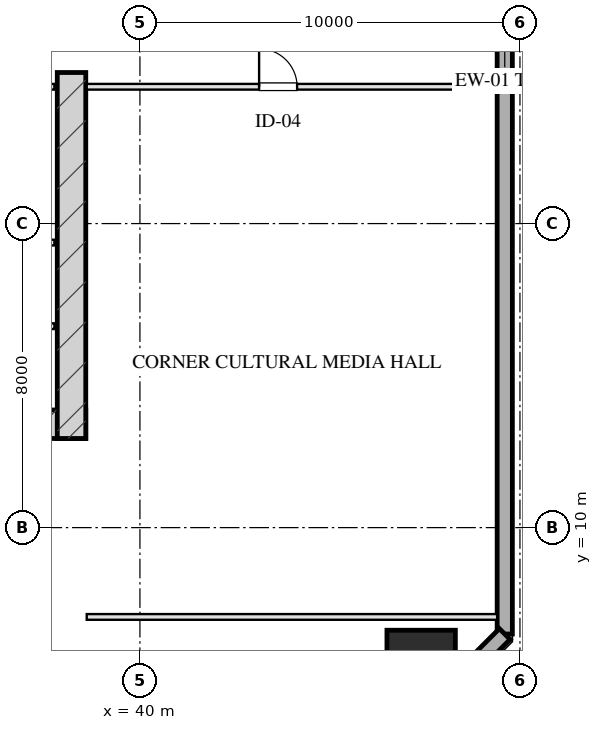
"""IFC4 building model, lengths in metres.
Left out: names, types, materials, properties, quantities, classifications, styles, units other than length and angle.
Written with IfcOpenShell. Run it as: python <this file> out.ifc"""

import sys

from ifc_helpers import new_model, si_unit, direction, frame, frame_2d, origin, origin_2d, place, context, subcontext, project, spatial, rectangle, hollow_rectangle, extrude, element, fill, save


model = new_model("IFC4")
c1 = context("Model", 3, precision=1e-05, world=origin(), true_north=direction((0.0, 1.0)))
c2 = subcontext(c1, "Body", "Model", "MODEL_VIEW")
j1 = project(units=[si_unit("LENGTHUNIT", "METRE"), si_unit("PLANEANGLEUNIT", "RADIAN")], contexts=[c1])
p1 = place(None, origin())
s1 = spatial("IfcSite", under=j1, at=p1, CompositionType="ELEMENT")
p2 = place(p1, origin())
s2 = spatial("IfcBuilding", under=s1, at=p2, CompositionType="ELEMENT")
p3 = place(p2, frame((0.0, 0.0, 78.2)))
s3 = spatial("IfcBuildingStorey", under=s2, at=p3, CompositionType="ELEMENT", Elevation=78.2)
p4 = place(p3, frame((21.425, 12.72, 0.0), z_axis=(0.0, 0.0, 1.0), x_axis=(1.0, 0.0, 0.0)))
e1 = element("IfcWall", 1, at=p4, inside=s3, PredefinedType="SHEAR", context=c2, shape_type="SweptSolid", body=[
    extrude(rectangle(XDim=17.15, YDim=0.75, at=frame_2d((8.575, 0.0))), origin(), (0.0, 0.0, 1.0), 3.45),
])
p5 = place(p3, frame((38.2, 21.975, 0.0), z_axis=(0.0, 0.0, 1.0), x_axis=(0.0, -1.0, 0.0)))
e2 = element("IfcWall", 2, at=p5, inside=s3, PredefinedType="SHEAR", context=c2, shape_type="SweptSolid", body=[
    extrude(rectangle(XDim=9.63, YDim=0.75, at=frame_2d((4.815, 0.0))), origin(), (0.0, 0.0, 1.0), 3.45),
])
p6 = place(p3, frame((47.4, 6.4, 0.0), z_axis=(0.0, 0.0, 1.0), x_axis=(1.0, 0.0, 0.0)))
e3 = element("IfcColumn", 3, at=p6, inside=s3, PredefinedType="COLUMN", context=c2, shape_type="SweptSolid", body=[
    extrude(hollow_rectangle(XDim=1.8, YDim=1.8, WallThickness=0.06, at=origin_2d()), origin(), (0.0, 0.0, 1.0), 3.451),
])
p7 = place(p3, frame((49.6, 60.8, 0.0), z_axis=(0.0, 0.0, 1.0), x_axis=(0.0, -1.0, 0.0)))
e4 = element("IfcWall", 4, at=p7, inside=s3, PredefinedType="SOLIDWALL", context=c2, shape_type="SweptSolid", body=[
    extrude(rectangle(XDim=53.6, YDim=0.4, at=frame_2d((26.8, 0.0))), origin(), (0.0, 0.0, 1.0), 2.61),
])
p8 = place(p7, frame((20.45, 0.0, 0.0)))
e5 = element("IfcOpeningElement", 5, at=p8, cuts=e4, PredefinedType="OPENING", context=c2, shape_type="SweptSolid", body=[
    extrude(rectangle(XDim=1.1, YDim=2.15, at=frame_2d((0.55, 1.075))), frame((0.0, 0.21, 0.0), z_axis=(0.0, -1.0, 0.0), x_axis=(1.0, 0.0, 0.0)), (0.0, 0.0, 1.0), 0.42),
])
p9 = place(p3, frame((49.6, 7.2, 0.0), z_axis=(0.0, 0.0, 1.0), x_axis=(-0.707106781187, -0.707106781187, 0.0)))
e6 = element("IfcWall", 6, at=p9, inside=s3, PredefinedType="SOLIDWALL", context=c2, shape_type="SweptSolid", body=[
    extrude(rectangle(XDim=4.243, YDim=0.4, at=frame_2d((2.121, 0.0))), origin(), (0.0, 0.0, 1.0), 2.61),
])
p10 = place(p3, frame((33.95, 21.6, 0.0), z_axis=(0.0, 0.0, 1.0), x_axis=(1.0, 0.0, 0.0)))
e7 = element("IfcWall", 7, at=p10, inside=s3, PredefinedType="PARTITIONING", context=c2, shape_type="SweptSolid", body=[
    extrude(rectangle(XDim=3.8, YDim=0.15, at=frame_2d((1.9, 0.0))), origin(), (0.0, 0.0, 1.0), 3.175),
])
p11 = place(p10, frame((0.22, 0.0, 0.0)))
e8 = element("IfcOpeningElement", 8, at=p11, cuts=e7, PredefinedType="OPENING", context=c2, shape_type="SweptSolid", body=[
    extrude(rectangle(XDim=0.95, YDim=2.05, at=frame_2d((0.475, 1.025))), frame((0.0, 0.085, 0.0), z_axis=(0.0, -1.0, 0.0), x_axis=(1.0, 0.0, 0.0)), (0.0, 0.0, 1.0), 0.17),
])
for number, where, z_axis, x_axis in (
    (9, (35.45, 17.5, 0.0), (0.0, 0.0, 1.0), (1.0, 0.0, 0.0)),
    (10, (35.45, 15.3, 0.0), (0.0, 0.0, 1.0), (1.0, 0.0, 0.0)),
):
    element("IfcWall", number, at=place(p3, frame(where, z_axis=z_axis, x_axis=x_axis)), inside=s3, PredefinedType="PARTITIONING", context=c2, shape_type="SweptSolid", body=[
        extrude(rectangle(XDim=2.3, YDim=0.15, at=frame_2d((1.15, 0.0))), origin(), (0.0, 0.0, 1.0), 3.175),
    ])
p12 = place(p3, frame((38.6, 7.65, 0.0), z_axis=(0.0, 0.0, 1.0), x_axis=(1.0, 0.0, 0.0)))
e11 = element("IfcWall", 11, at=p12, inside=s3, PredefinedType="PARTITIONING", context=c2, shape_type="SweptSolid", body=[
    extrude(rectangle(XDim=10.8, YDim=0.15, at=frame_2d((5.4, 0.0))), origin(), (0.0, 0.0, 1.0), 3.175),
])
p13 = place(p3, frame((38.6, 21.6, 0.0), z_axis=(0.0, 0.0, 1.0), x_axis=(1.0, 0.0, 0.0)))
e12 = element("IfcWall", 12, at=p13, inside=s3, PredefinedType="PARTITIONING", context=c2, shape_type="SweptSolid", body=[
    extrude(rectangle(XDim=10.8, YDim=0.15, at=frame_2d((5.4, 0.0))), origin(), (0.0, 0.0, 1.0), 3.175),
])
p14 = place(p13, frame((4.536, 0.0, 0.0)))
e13 = element("IfcOpeningElement", 13, at=p14, cuts=e12, PredefinedType="OPENING", context=c2, shape_type="SweptSolid", body=[
    extrude(rectangle(XDim=1.0, YDim=2.05, at=frame_2d((0.5, 1.025))), frame((0.0, 0.085, 0.0), z_axis=(0.0, -1.0, 0.0), x_axis=(1.0, 0.0, 0.0)), (0.0, 0.0, 1.0), 0.17),
])
p15 = place(p14, origin())
e14 = element("IfcDoor", 14, at=p15, inside=s3, OperationType="SINGLE_SWING_LEFT", PredefinedType="DOOR", context=c2, shape_type="SweptSolid", body=[
    extrude(rectangle(XDim=1.0, YDim=2.05, at=frame_2d((0.5, 1.025))), frame((0.0, 0.025, 0.0), z_axis=(0.0, -1.0, 0.0), x_axis=(1.0, 0.0, 0.0)), (0.0, 0.0, 1.0), 0.05),
])
fill(e13, e14)
save(model, sys.argv[1])
